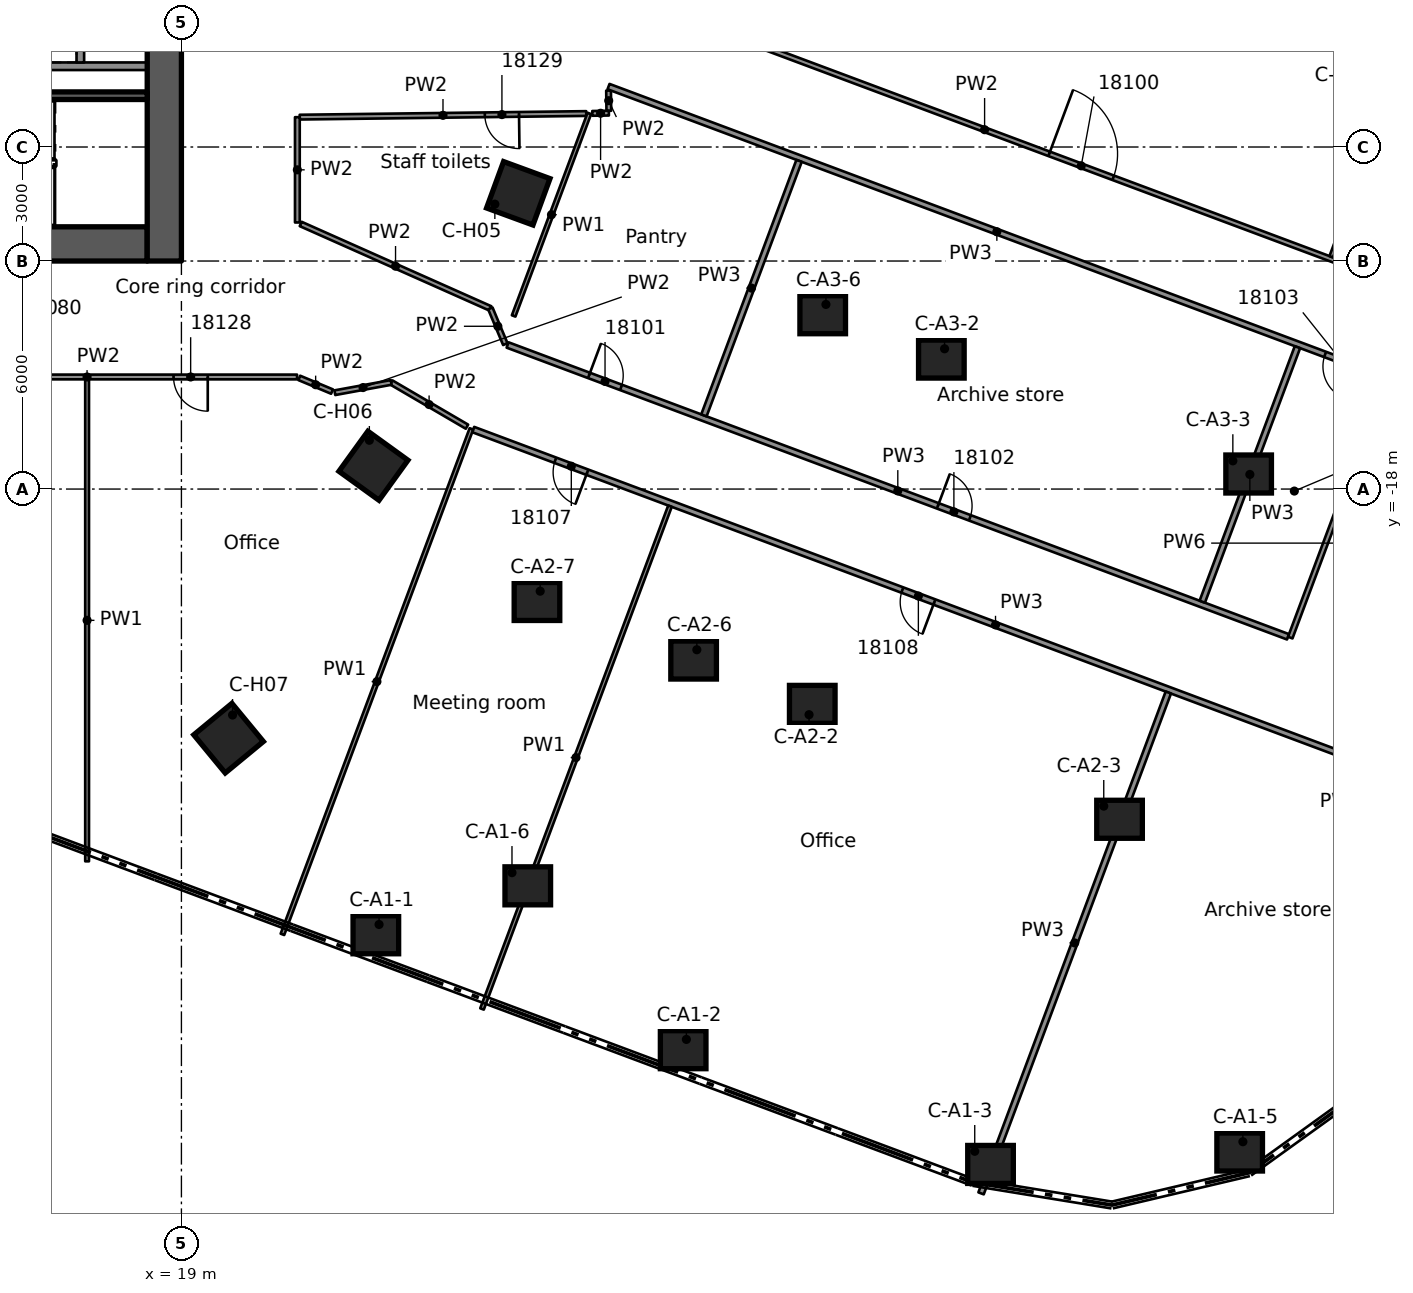
"""IFC4 building model, lengths in metres.
Left out: names, types, materials, properties, quantities, classifications, styles, units other than length and angle.
Written with IfcOpenShell. Run it as: python <this file> out.ifc"""

import sys

from ifc_helpers import new_model, si_unit, direction, frame, frame_2d, origin, origin_2d, place, context, subcontext, project, spatial, rectangle, extrude, element, fill, save


model = new_model("IFC4")
c1 = context("Model", 3, precision=1e-05, world=origin(), true_north=direction((0.0, 1.0)))
c2 = subcontext(c1, "Body", "Model", "MODEL_VIEW")
j1 = project(units=[si_unit("LENGTHUNIT", "METRE"), si_unit("PLANEANGLEUNIT", "RADIAN")], contexts=[c1])
p1 = place(None, origin())
s1 = spatial("IfcSite", under=j1, at=p1, CompositionType="ELEMENT")
p2 = place(p1, origin())
s2 = spatial("IfcBuilding", under=s1, at=p2, CompositionType="ELEMENT")
p3 = place(p2, frame((0.0, 0.0, 91.2)))
s3 = spatial("IfcBuildingStorey", under=s2, at=p3, CompositionType="ELEMENT", Elevation=91.2)
p4 = place(p3, frame((8.9, -11.55, 0.0), z_axis=(0.0, 0.0, 1.0), x_axis=(1.0, 0.0, 0.0)))
e1 = element("IfcWall", 1, at=p4, inside=s3, PredefinedType="SHEAR", context=c2, shape_type="SweptSolid", body=[
    extrude(rectangle(XDim=9.2, YDim=0.9, at=frame_2d((4.6, 0.0))), origin(), (0.0, 0.0, 1.0), 3.5),
])
p5 = place(p4, frame((3.0, 0.0, 0.0)))
e2 = element("IfcOpeningElement", 2, at=p5, cuts=e1, PredefinedType="OPENING", context=c2, shape_type="SweptSolid", body=[
    extrude(rectangle(XDim=1.1, YDim=2.1, at=frame_2d((0.55, 1.05))), frame((0.0, 0.46, 0.0), z_axis=(0.0, -1.0, 0.0), x_axis=(1.0, 0.0, 0.0)), (0.0, 0.0, 1.0), 0.92),
])
p6 = place(p3, frame((18.55, -12.0, 0.0), z_axis=(0.0, 0.0, 1.0), x_axis=(0.0, 1.0, 0.0)))
e3 = element("IfcWall", 3, at=p6, inside=s3, PredefinedType="SHEAR", context=c2, shape_type="SweptSolid", body=[
    extrude(rectangle(XDim=24.0, YDim=0.9, at=frame_2d((12.0, 0.0))), origin(), (0.0, 0.0, 1.0), 3.5),
])
p7 = place(p6, frame((12.1, 0.0, 0.0)))
e4 = element("IfcOpeningElement", 4, at=p7, cuts=e3, PredefinedType="OPENING", context=c2, shape_type="SweptSolid", body=[
    extrude(rectangle(XDim=1.8, YDim=2.1, at=frame_2d((0.9, 1.05))), frame((0.0, 0.46, 0.0), z_axis=(0.0, -1.0, 0.0), x_axis=(1.0, 0.0, 0.0)), (0.0, 0.0, 1.0), 0.92),
])
for number, where, z_axis, x_axis in (
    (5, (24.116, -29.728, 0.0), (0.0, 0.0, 1.0), (1.0, 0.0, 0.0)),
    (6, (32.203, -32.752, 0.0), (0.0, 0.0, 1.0), (1.0, 0.0, 0.0)),
    (7, (40.291, -35.771, 0.0), (0.0, 0.0, 1.0), (1.0, 0.0, 0.0)),
    (8, (46.847, -35.444, 0.0), (0.0, 0.0, 1.0), (1.0, 0.0, 0.0)),
    (9, (28.114, -28.44, 0.0), (0.0, 0.0, 1.0), (1.0, 0.0, 0.0)),
    (10, (35.6, -23.666, 0.0), (0.0, 0.0, 1.0), (1.0, 0.0, 0.0)),
    (11, (43.686, -26.689, 0.0), (0.0, 0.0, 1.0), (1.0, 0.0, 0.0)),
    (12, (32.478, -22.499, 0.0), (0.0, 0.0, 1.0), (1.0, 0.0, 0.0)),
    (13, (28.356, -20.958, 0.0), (0.0, 0.0, 1.0), (1.0, 0.0, 0.0)),
    (14, (38.997, -14.58, 0.0), (0.0, 0.0, 1.0), (1.0, 0.0, 0.0)),
    (15, (47.083, -17.604, 0.0), (0.0, 0.0, 1.0), (1.0, 0.0, 0.0)),
    (16, (35.875, -13.413, 0.0), (0.0, 0.0, 1.0), (1.0, 0.0, 0.0)),
):
    element("IfcColumn", number, at=place(p3, frame(where, z_axis=z_axis, x_axis=x_axis)), inside=s3, PredefinedType="COLUMN", context=c2, shape_type="SweptSolid", body=[
        extrude(rectangle(XDim=1.2, YDim=1.0, at=origin_2d()), origin(), (0.0, 0.0, 1.0), 3.5),
    ])
for number, where, z_axis, x_axis in (
    (17, (27.864, -10.218, 0.0), (0.0, 0.0, 1.0), (0.939, -0.344, 0.0)),
    (18, (24.053, -17.387, 0.0), (0.0, 0.0, 1.0), (0.81, -0.586, 0.0)),
    (19, (20.241, -24.555, 0.0), (0.0, 0.0, 1.0), (0.636, -0.772, 0.0)),
):
    element("IfcColumn", number, at=place(p3, frame(where, z_axis=z_axis, x_axis=x_axis)), inside=s3, PredefinedType="COLUMN", context=c2, shape_type="SweptSolid", body=[
        extrude(rectangle(XDim=1.3, YDim=1.3, at=origin_2d()), origin(), (0.0, 0.0, 1.0), 3.5),
    ])
p8 = place(p3, frame((11.54, -6.875, 0.0), z_axis=(0.0, 0.0, 1.0), x_axis=(1.0, 0.0, 0.0)))
e20 = element("IfcWall", 20, at=p8, inside=s3, PredefinedType="SOLIDWALL", context=c2, shape_type="SweptSolid", body=[
    extrude(rectangle(XDim=6.56, YDim=0.2, at=frame_2d((3.28, 0.0))), origin(), (0.0, 0.0, 1.0), 3.09),
])
p9 = place(p3, frame((16.34, -4.025, 0.0), z_axis=(0.0, 0.0, 1.0), x_axis=(0.0, -1.0, 0.0)))
e21 = element("IfcWall", 21, at=p9, inside=s3, PredefinedType="SOLIDWALL", context=c2, shape_type="SweptSolid", body=[
    extrude(rectangle(XDim=2.75, YDim=0.2, at=frame_2d((1.375, 0.0))), origin(), (0.0, 0.0, 1.0), 3.09),
])
p10 = place(p9, frame((0.925, 0.0, 0.0)))
e22 = element("IfcOpeningElement", 22, at=p10, cuts=e21, PredefinedType="OPENING", context=c2, shape_type="SweptSolid", body=[
    extrude(rectangle(XDim=1.1, YDim=2.1, at=frame_2d((0.55, 1.05))), frame((0.0, 0.11, 0.0), z_axis=(0.0, -1.0, 0.0), x_axis=(1.0, 0.0, 0.0)), (0.0, 0.0, 1.0), 0.22),
])
p11 = place(p3, frame((11.54, -7.65, 0.0), z_axis=(0.0, 0.0, 1.0), x_axis=(1.0, 0.0, 0.0)))
e23 = element("IfcWall", 23, at=p11, inside=s3, PredefinedType="SOLIDWALL", context=c2, shape_type="SweptSolid", body=[
    extrude(rectangle(XDim=6.56, YDim=0.2, at=frame_2d((3.28, 0.0))), origin(), (0.0, 0.0, 1.0), 3.09),
])
p12 = place(p3, frame((30.24, -7.515, 0.0), z_axis=(0.0, 0.0, 1.0), x_axis=(0.013301575401, -0.999911530132, 0.0)))
e24 = element("IfcWall", 24, at=p12, inside=s3, PredefinedType="PARTITIONING", context=c2, shape_type="SweptSolid", body=[
    extrude(rectangle(XDim=0.532, YDim=0.125, at=frame_2d((0.266, 0.0))), origin(), (0.0, 0.0, 1.0), 3.08),
])
p13 = place(p3, frame((24.521, -15.194, 0.0), z_axis=(0.0, 0.0, 1.0), x_axis=(0.863352795858, -0.504600782683, 0.0)))
e25 = element("IfcWall", 25, at=p13, inside=s3, PredefinedType="PARTITIONING", context=c2, shape_type="SweptSolid", body=[
    extrude(rectangle(XDim=2.308, YDim=0.125, at=frame_2d((1.154, 0.0))), origin(), (0.0, 0.0, 1.0), 3.08),
])
p14 = place(p3, frame((22.963, -15.435, 0.0), z_axis=(0.0, 0.0, 1.0), x_axis=(-0.922689792095, 0.385543185082, 0.0)))
e26 = element("IfcWall", 26, at=p14, inside=s3, PredefinedType="PARTITIONING", context=c2, shape_type="SweptSolid", body=[
    extrude(rectangle(XDim=0.934, YDim=0.125, at=frame_2d((0.467, 0.0))), origin(), (0.0, 0.0, 1.0), 3.08),
])
p15 = place(p3, frame((27.13, -13.247, 0.0), z_axis=(0.0, 0.0, 1.0), x_axis=(-0.913542302976, 0.406743728498, 0.0)))
e27 = element("IfcWall", 27, at=p15, inside=s3, PredefinedType="PARTITIONING", context=c2, shape_type="SweptSolid", body=[
    extrude(rectangle(XDim=5.463, YDim=0.125, at=frame_2d((2.732, 0.0))), origin(), (0.0, 0.0, 1.0), 3.08),
])
p16 = place(p3, frame((49.585, -25.001, 0.0), z_axis=(0.0, 0.0, 1.0), x_axis=(-0.936641004212, 0.350290778111, 0.0)))
e28 = element("IfcWall", 28, at=p16, inside=s3, PredefinedType="PARTITIONING", context=c2, shape_type="SweptSolid", body=[
    extrude(rectangle(XDim=24.457, YDim=0.15, at=frame_2d((12.228, 0.0))), origin(), (0.0, 0.0, 1.0), 3.08),
])
p17 = place(p16, frame((21.25, 0.0, 0.0)))
e29 = element("IfcOpeningElement", 29, at=p17, cuts=e28, PredefinedType="OPENING", context=c2, shape_type="SweptSolid", body=[
    extrude(rectangle(XDim=0.9, YDim=2.1, at=frame_2d((0.45, 1.05))), frame((0.0, 0.085, 0.0), z_axis=(0.0, -1.0, 0.0), x_axis=(1.0, 0.0, 0.0)), (0.0, 0.0, 1.0), 0.17),
])
p18 = place(p16, frame((11.5, 0.0, 0.0)))
e30 = element("IfcOpeningElement", 30, at=p18, cuts=e28, PredefinedType="OPENING", context=c2, shape_type="SweptSolid", body=[
    extrude(rectangle(XDim=0.9, YDim=2.1, at=frame_2d((0.45, 1.05))), frame((0.0, 0.085, 0.0), z_axis=(0.0, -1.0, 0.0), x_axis=(1.0, 0.0, 0.0)), (0.0, 0.0, 1.0), 0.17),
])
p19 = place(p3, frame((27.583, -14.209, 0.0), z_axis=(0.0, 0.0, 1.0), x_axis=(0.936658709203, -0.350243433164, 0.0)))
e31 = element("IfcWall", 31, at=p19, inside=s3, PredefinedType="PARTITIONING", context=c2, shape_type="SweptSolid", body=[
    extrude(rectangle(XDim=21.925, YDim=0.15, at=frame_2d((10.962, 0.0))), origin(), (0.0, 0.0, 1.0), 3.08),
])
p20 = place(p19, frame((2.288, 0.0, 0.0)))
e32 = element("IfcOpeningElement", 32, at=p20, cuts=e31, PredefinedType="OPENING", context=c2, shape_type="SweptSolid", body=[
    extrude(rectangle(XDim=0.9, YDim=2.1, at=frame_2d((0.45, 1.05))), frame((0.0, 0.085, 0.0), z_axis=(0.0, -1.0, 0.0), x_axis=(1.0, 0.0, 0.0)), (0.0, 0.0, 1.0), 0.17),
])
p21 = place(p19, frame((12.088, 0.0, 0.0)))
e33 = element("IfcOpeningElement", 33, at=p21, cuts=e31, PredefinedType="OPENING", context=c2, shape_type="SweptSolid", body=[
    extrude(rectangle(XDim=0.9, YDim=2.1, at=frame_2d((0.45, 1.05))), frame((0.0, 0.085, 0.0), z_axis=(0.0, -1.0, 0.0), x_axis=(1.0, 0.0, 0.0)), (0.0, 0.0, 1.0), 0.17),
])
p22 = place(p3, frame((50.676, -15.049, 0.0), z_axis=(0.0, 0.0, 1.0), x_axis=(-0.936701134279, 0.350129954505, 0.0)))
e34 = element("IfcWall", 34, at=p22, inside=s3, PredefinedType="PARTITIONING", context=c2, shape_type="SweptSolid", body=[
    extrude(rectangle(XDim=21.818, YDim=0.15, at=frame_2d((10.909, 0.0))), origin(), (0.0, 0.0, 1.0), 3.08),
])
p23 = place(p22, frame((0.788, 0.0, 0.0)))
e35 = element("IfcOpeningElement", 35, at=p23, cuts=e34, PredefinedType="OPENING", context=c2, shape_type="SweptSolid", body=[
    extrude(rectangle(XDim=0.9, YDim=2.1, at=frame_2d((0.45, 1.05))), frame((0.0, 0.085, 0.0), z_axis=(0.0, -1.0, 0.0), x_axis=(1.0, 0.0, 0.0)), (0.0, 0.0, 1.0), 0.17),
])
p24 = place(p3, frame((30.869, -5.082, 0.0), z_axis=(0.0, 0.0, 1.0), x_axis=(0.936726175225, -0.350062955264, 0.0)))
e36 = element("IfcWall", 36, at=p24, inside=s3, PredefinedType="PARTITIONING", context=c2, shape_type="SweptSolid", body=[
    extrude(rectangle(XDim=24.73, YDim=0.125, at=frame_2d((12.365, 0.0))), origin(), (0.0, 0.0, 1.0), 3.08),
])
p25 = place(p24, frame((11.706, 0.0, 0.0)))
e37 = element("IfcOpeningElement", 37, at=p25, cuts=e36, PredefinedType="OPENING", context=c2, shape_type="SweptSolid", body=[
    extrude(rectangle(XDim=1.8, YDim=2.1, at=frame_2d((0.9, 1.05))), frame((0.0, 0.073, 0.0), z_axis=(0.0, -1.0, 0.0), x_axis=(1.0, 0.0, 0.0)), (0.0, 0.0, 1.0), 0.145),
])
p26 = place(p24, frame((20.457, 0.0, 0.0)))
e38 = element("IfcOpeningElement", 38, at=p26, cuts=e36, PredefinedType="OPENING", context=c2, shape_type="SweptSolid", body=[
    extrude(rectangle(XDim=0.9, YDim=2.1, at=frame_2d((0.45, 1.05))), frame((0.0, 0.073, 0.0), z_axis=(0.0, -1.0, 0.0), x_axis=(1.0, 0.0, 0.0)), (0.0, 0.0, 1.0), 0.145),
])
p27 = place(p3, frame((22.043, -15.051, 0.0), z_axis=(0.0, 0.0, 1.0), x_axis=(-1.0, 0.0, 0.0)))
e39 = element("IfcWall", 39, at=p27, inside=s3, PredefinedType="PARTITIONING", context=c2, shape_type="SweptSolid", body=[
    extrude(rectangle(XDim=11.052, YDim=0.125, at=frame_2d((5.526, 0.0))), origin(), (0.0, 0.0, 1.0), 3.08),
])
p28 = place(p27, frame((2.35, 0.0, 0.0)))
e40 = element("IfcOpeningElement", 40, at=p28, cuts=e39, PredefinedType="OPENING", context=c2, shape_type="SweptSolid", body=[
    extrude(rectangle(XDim=0.9, YDim=2.1, at=frame_2d((0.45, 1.05))), frame((0.0, 0.073, 0.0), z_axis=(0.0, -1.0, 0.0), x_axis=(1.0, 0.0, 0.0)), (0.0, 0.0, 1.0), 0.145),
])
p29 = place(p3, frame((29.653, -8.119, 0.0), z_axis=(0.0, 0.0, 1.0), x_axis=(-0.999920277631, -0.012626891215, 0.0)))
e41 = element("IfcWall", 41, at=p29, inside=s3, PredefinedType="PARTITIONING", context=c2, shape_type="SweptSolid", body=[
    extrude(rectangle(XDim=7.541, YDim=0.125, at=frame_2d((3.77, 0.0))), origin(), (0.0, 0.0, 1.0), 3.08),
])
p30 = place(p29, frame((1.769, 0.0, 0.0)))
e42 = element("IfcOpeningElement", 42, at=p30, cuts=e41, PredefinedType="OPENING", context=c2, shape_type="SweptSolid", body=[
    extrude(rectangle(XDim=0.9, YDim=2.1, at=frame_2d((0.45, 1.05))), frame((0.0, 0.073, 0.0), z_axis=(0.0, -1.0, 0.0), x_axis=(1.0, 0.0, 0.0)), (0.0, 0.0, 1.0), 0.145),
])
p31 = place(p3, frame((29.812, -8.115, 0.0), z_axis=(0.0, 0.0, 1.0), x_axis=(0.999902045747, 0.013996389218, 0.0)))
e43 = element("IfcWall", 43, at=p31, inside=s3, PredefinedType="PARTITIONING", context=c2, shape_type="SweptSolid", body=[
    extrude(rectangle(XDim=0.436, YDim=0.125, at=frame_2d((0.218, 0.0))), origin(), (0.0, 0.0, 1.0), 3.08),
])
p32 = place(p3, frame((23.037, -15.465, 0.0), z_axis=(0.0, 0.0, 1.0), x_axis=(0.983729770304, 0.179654499019, 0.0)))
e44 = element("IfcWall", 44, at=p32, inside=s3, PredefinedType="PARTITIONING", context=c2, shape_type="SweptSolid", body=[
    extrude(rectangle(XDim=1.509, YDim=0.125, at=frame_2d((0.754, 0.0))), origin(), (0.0, 0.0, 1.0), 3.08),
])
p33 = place(p3, frame((27.523, -14.187, 0.0), z_axis=(0.0, 0.0, 1.0), x_axis=(-0.385806130442, 0.922579877145, 0.0)))
e45 = element("IfcWall", 45, at=p33, inside=s3, PredefinedType="PARTITIONING", context=c2, shape_type="SweptSolid", body=[
    extrude(rectangle(XDim=1.019, YDim=0.125, at=frame_2d((0.509, 0.0))), origin(), (0.0, 0.0, 1.0), 3.08),
])
p34 = place(p3, frame((48.178, -21.909, 0.0), z_axis=(0.0, 0.0, 1.0), x_axis=(0.350170212359, 0.93668608529, 0.0)))
e46 = element("IfcWall", 46, at=p34, inside=s3, PredefinedType="PARTITIONING", context=c2, shape_type="SweptSolid", body=[
    extrude(rectangle(XDim=7.299, YDim=0.125, at=frame_2d((3.649, 0.0))), origin(), (0.0, 0.0, 1.0), 2.469),
])
p35 = place(p3, frame((40.042, -36.532, 0.0), z_axis=(0.0, 0.0, 1.0), x_axis=(0.350242868869, 0.936658920209, 0.0)))
e47 = element("IfcWall", 47, at=p35, inside=s3, PredefinedType="PARTITIONING", context=c2, shape_type="SweptSolid", body=[
    extrude(rectangle(XDim=14.07, YDim=0.15, at=frame_2d((7.035, 0.0))), origin(), (0.0, 0.0, 1.0), 3.08),
])
p36 = place(p3, frame((45.863, -20.964, 0.0), z_axis=(0.0, 0.0, 1.0), x_axis=(0.35020646324, 0.936672532481, 0.0)))
e48 = element("IfcWall", 48, at=p36, inside=s3, PredefinedType="PARTITIONING", context=c2, shape_type="SweptSolid", body=[
    extrude(rectangle(XDim=7.15, YDim=0.15, at=frame_2d((3.575, 0.0))), origin(), (0.0, 0.0, 1.0), 3.08),
])
p37 = place(p3, frame((49.256, -11.889, 0.0), z_axis=(0.0, 0.0, 1.0), x_axis=(0.35014670301, 0.936694873676, 0.0)))
e49 = element("IfcWall", 49, at=p37, inside=s3, PredefinedType="PARTITIONING", context=c2, shape_type="SweptSolid", body=[
    extrude(rectangle(XDim=14.083, YDim=0.1, at=frame_2d((7.041, 0.0))), origin(), (0.0, 0.0, 1.0), 2.445),
])
p38 = place(p3, frame((26.91, -31.68, 0.0), z_axis=(0.0, 0.0, 1.0), x_axis=(0.350179920227, 0.936682456049, 0.0)))
e50 = element("IfcWall", 50, at=p38, inside=s3, PredefinedType="PARTITIONING", context=c2, shape_type="SweptSolid", body=[
    extrude(rectangle(XDim=14.124, YDim=0.1, at=frame_2d((7.062, 0.0))), origin(), (0.0, 0.0, 1.0), 3.08),
])
p39 = place(p3, frame((32.749, -16.061, 0.0), z_axis=(0.0, 0.0, 1.0), x_axis=(0.35020646324, 0.936672532481, 0.0)))
e51 = element("IfcWall", 51, at=p39, inside=s3, PredefinedType="PARTITIONING", context=c2, shape_type="SweptSolid", body=[
    extrude(rectangle(XDim=7.15, YDim=0.15, at=frame_2d((3.575, 0.0))), origin(), (0.0, 0.0, 1.0), 3.08),
])
p40 = place(p3, frame((21.658, -29.717, 0.0), z_axis=(0.0, 0.0, 1.0), x_axis=(0.350213245568, 0.936669996652, 0.0)))
e52 = element("IfcWall", 52, at=p40, inside=s3, PredefinedType="PARTITIONING", context=c2, shape_type="SweptSolid", body=[
    extrude(rectangle(XDim=14.2, YDim=0.1, at=frame_2d((7.1, 0.0))), origin(), (0.0, 0.0, 1.0), 3.08),
])
p41 = place(p3, frame((27.742, -13.445, 0.0), z_axis=(0.0, 0.0, 1.0), x_axis=(0.350126252707, 0.936702517967, 0.0)))
e53 = element("IfcWall", 53, at=p41, inside=s3, PredefinedType="PARTITIONING", context=c2, shape_type="SweptSolid", body=[
    extrude(rectangle(XDim=5.689, YDim=0.1, at=frame_2d((2.845, 0.0))), origin(), (0.0, 0.0, 1.0), 3.08),
])
p42 = place(p3, frame((22.051, -10.986, 0.0), z_axis=(0.0, 0.0, 1.0), x_axis=(0.0, 1.0, 0.0)))
e54 = element("IfcWall", 54, at=p42, inside=s3, PredefinedType="PARTITIONING", context=c2, shape_type="SweptSolid", body=[
    extrude(rectangle(XDim=2.771, YDim=0.125, at=frame_2d((1.385, 0.0))), origin(), (0.0, 0.0, 1.0), 3.08),
])
p43 = place(p3, frame((16.518, -27.795, 0.0), z_axis=(0.0, 0.0, 1.0), x_axis=(0.0, 1.0, 0.0)))
e55 = element("IfcWall", 55, at=p43, inside=s3, PredefinedType="PARTITIONING", context=c2, shape_type="SweptSolid", body=[
    extrude(rectangle(XDim=12.681, YDim=0.1, at=frame_2d((6.34, 0.0))), origin(), (0.0, 0.0, 1.0), 3.08),
])
p44 = place(p25, origin())
e56 = element("IfcDoor", 56, at=p44, inside=s3, OperationType="DOUBLE_DOOR_SINGLE_SWING", PredefinedType="DOOR", context=c2, shape_type="SweptSolid", body=[
    extrude(rectangle(XDim=1.8, YDim=2.1, at=frame_2d((0.9, 1.05))), frame((0.0, 0.025, 0.0), z_axis=(0.0, -1.0, 0.0), x_axis=(1.0, 0.0, 0.0)), (0.0, 0.0, 1.0), 0.05),
])
fill(e37, e56)
p45 = place(p20, origin())
e57 = element("IfcDoor", 57, at=p45, inside=s3, OperationType="SINGLE_SWING_LEFT", PredefinedType="DOOR", context=c2, shape_type="SweptSolid", body=[
    extrude(rectangle(XDim=0.9, YDim=2.1, at=frame_2d((0.45, 1.05))), frame((0.0, 0.025, 0.0), z_axis=(0.0, -1.0, 0.0), x_axis=(1.0, 0.0, 0.0)), (0.0, 0.0, 1.0), 0.05),
])
fill(e32, e57)
p46 = place(p21, origin())
e58 = element("IfcDoor", 58, at=p46, inside=s3, OperationType="SINGLE_SWING_RIGHT", PredefinedType="DOOR", context=c2, shape_type="SweptSolid", body=[
    extrude(rectangle(XDim=0.9, YDim=2.1, at=frame_2d((0.45, 1.05))), frame((0.0, 0.025, 0.0), z_axis=(0.0, -1.0, 0.0), x_axis=(1.0, 0.0, 0.0)), (0.0, 0.0, 1.0), 0.05),
])
fill(e33, e58)
p47 = place(p23, origin())
e59 = element("IfcDoor", 59, at=p47, inside=s3, OperationType="SINGLE_SWING_LEFT", PredefinedType="DOOR", context=c2, shape_type="SweptSolid", body=[
    extrude(rectangle(XDim=0.9, YDim=2.1, at=frame_2d((0.45, 1.05))), frame((0.0, 0.025, 0.0), z_axis=(0.0, -1.0, 0.0), x_axis=(1.0, 0.0, 0.0)), (0.0, 0.0, 1.0), 0.05),
])
fill(e35, e59)
p48 = place(p17, origin())
e60 = element("IfcDoor", 60, at=p48, inside=s3, OperationType="SINGLE_SWING_RIGHT", PredefinedType="DOOR", context=c2, shape_type="SweptSolid", body=[
    extrude(rectangle(XDim=0.9, YDim=2.1, at=frame_2d((0.45, 1.05))), frame((0.0, 0.025, 0.0), z_axis=(0.0, -1.0, 0.0), x_axis=(1.0, 0.0, 0.0)), (0.0, 0.0, 1.0), 0.05),
])
fill(e29, e60)
p49 = place(p18, origin())
e61 = element("IfcDoor", 61, at=p49, inside=s3, OperationType="SINGLE_SWING_LEFT", PredefinedType="DOOR", context=c2, shape_type="SweptSolid", body=[
    extrude(rectangle(XDim=0.9, YDim=2.1, at=frame_2d((0.45, 1.05))), frame((0.0, 0.025, 0.0), z_axis=(0.0, -1.0, 0.0), x_axis=(1.0, 0.0, 0.0)), (0.0, 0.0, 1.0), 0.05),
])
fill(e30, e61)
p50 = place(p28, origin())
e62 = element("IfcDoor", 62, at=p50, inside=s3, OperationType="SINGLE_SWING_LEFT", PredefinedType="DOOR", context=c2, shape_type="SweptSolid", body=[
    extrude(rectangle(XDim=0.9, YDim=2.1, at=frame_2d((0.45, 1.05))), frame((0.0, 0.025, 0.0), z_axis=(0.0, -1.0, 0.0), x_axis=(1.0, 0.0, 0.0)), (0.0, 0.0, 1.0), 0.05),
])
fill(e40, e62)
p51 = place(p30, origin())
e63 = element("IfcDoor", 63, at=p51, inside=s3, OperationType="SINGLE_SWING_LEFT", PredefinedType="DOOR", context=c2, shape_type="SweptSolid", body=[
    extrude(rectangle(XDim=0.9, YDim=2.1, at=frame_2d((0.45, 1.05))), frame((0.0, 0.025, 0.0), z_axis=(0.0, -1.0, 0.0), x_axis=(1.0, 0.0, 0.0)), (0.0, 0.0, 1.0), 0.05),
])
fill(e42, e63)
save(model, sys.argv[1])
